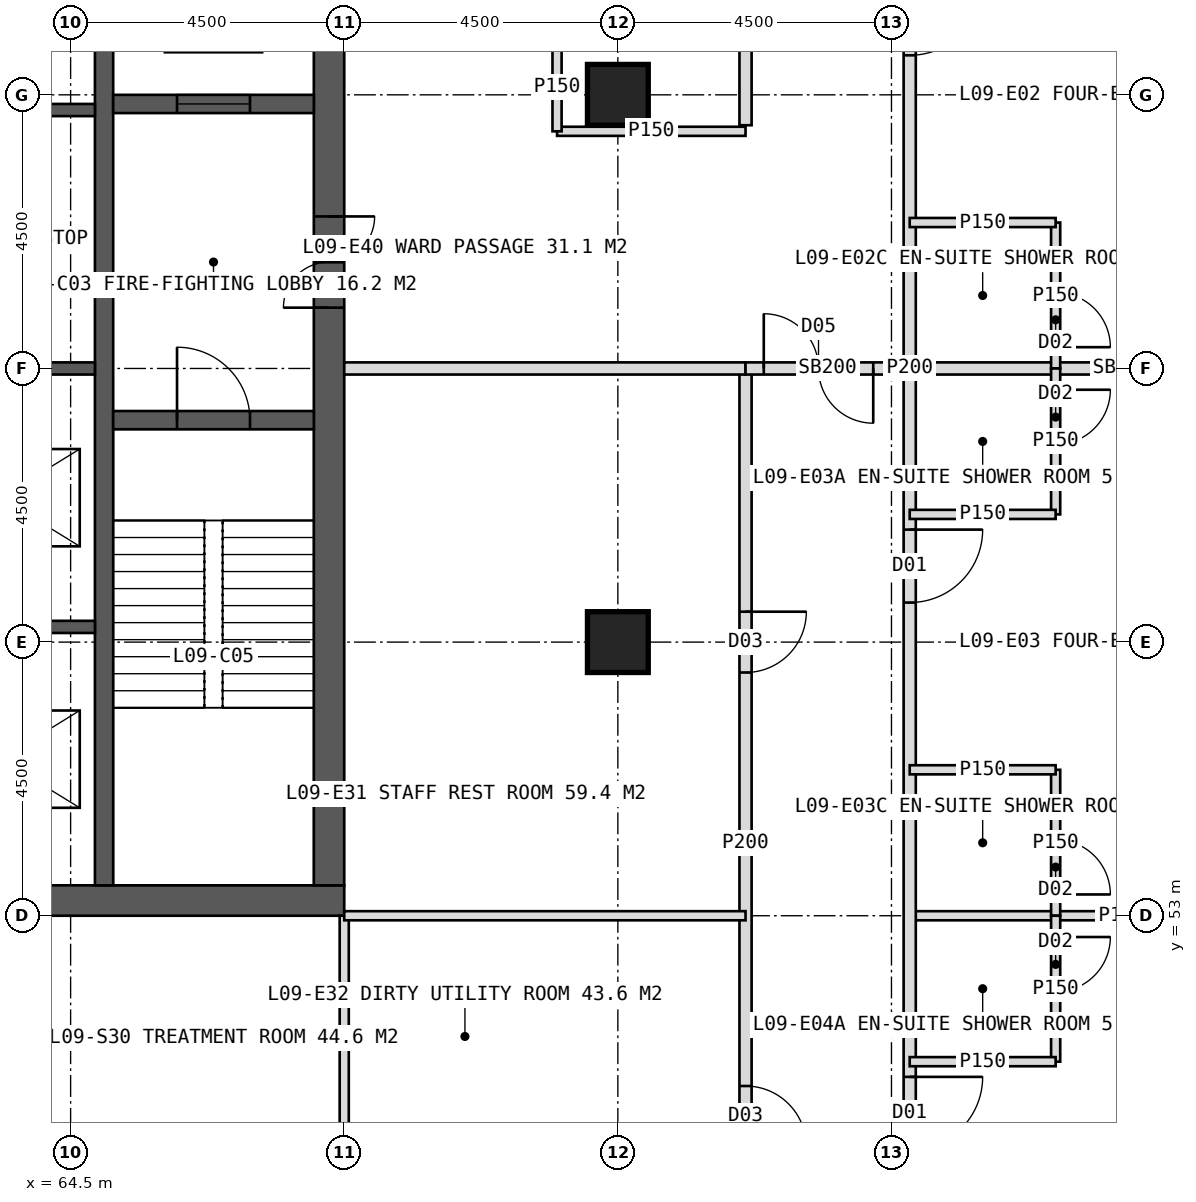
"""IFC4 building model, lengths in metres.
Left out: names, types, materials, properties, quantities, classifications, styles, units other than length and angle.
Written with IfcOpenShell. Run it as: python <this file> out.ifc"""

import sys

from ifc_helpers import new_model, si_unit, direction, frame, frame_2d, origin, origin_2d, place, context, subcontext, project, spatial, rectangle, hollow_rectangle, extrude, element, fill, save


model = new_model("IFC4")
c1 = context("Model", 3, precision=1e-05, world=origin(), true_north=direction((0.0, 1.0)))
c2 = subcontext(c1, "Body", "Model", "MODEL_VIEW")
j1 = project(units=[si_unit("LENGTHUNIT", "METRE"), si_unit("PLANEANGLEUNIT", "RADIAN")], contexts=[c1])
p1 = place(None, origin())
s1 = spatial("IfcSite", under=j1, at=p1, CompositionType="ELEMENT")
p2 = place(p1, origin())
s2 = spatial("IfcBuilding", under=s1, at=p2, CompositionType="ELEMENT")
p3 = place(p2, frame((0.0, 0.0, 43.0)))
s3 = spatial("IfcBuildingStorey", under=s2, at=p3, CompositionType="ELEMENT", Elevation=43.0)
p4 = place(p3, frame((51.0, 53.25, 0.0), z_axis=(0.0, 0.0, 1.0), x_axis=(1.0, 0.0, 0.0)))
e1 = element("IfcWall", 1, at=p4, inside=s3, PredefinedType="SHEAR", context=c2, shape_type="SweptSolid", body=[
    extrude(rectangle(XDim=18.0, YDim=0.5, at=frame_2d((9.0, 0.0))), origin(), (0.0, 0.0, 1.0), 4.0),
])
p5 = place(p4, frame((8.1, 0.0, 0.0)))
e2 = element("IfcOpeningElement", 2, at=p5, cuts=e1, PredefinedType="OPENING", context=c2, shape_type="SweptSolid", body=[
    extrude(rectangle(XDim=1.8, YDim=2.2, at=frame_2d((0.9, 1.1))), frame((0.0, 0.26, 0.0), z_axis=(0.0, -1.0, 0.0), x_axis=(1.0, 0.0, 0.0)), (0.0, 0.0, 1.0), 0.52),
])
p6 = place(p3, frame((68.75, 53.5, 0.0), z_axis=(0.0, 0.0, 1.0), x_axis=(0.0, 1.0, 0.0)))
e3 = element("IfcWall", 3, at=p6, inside=s3, PredefinedType="SHEAR", context=c2, shape_type="SweptSolid", body=[
    extrude(rectangle(XDim=17.0, YDim=0.5, at=frame_2d((8.5, 0.0))), origin(), (0.0, 0.0, 1.0), 4.0),
])
p7 = place(p6, frame((9.5, 0.0, 0.0)))
e4 = element("IfcOpeningElement", 4, at=p7, cuts=e3, PredefinedType="OPENING", context=c2, shape_type="SweptSolid", body=[
    extrude(rectangle(XDim=1.5, YDim=2.2, at=frame_2d((0.75, 1.1))), frame((0.0, 0.26, 0.0), z_axis=(0.0, -1.0, 0.0), x_axis=(1.0, 0.0, 0.0)), (0.0, 0.0, 1.0), 0.52),
])
p8 = place(p3, frame((65.05, 53.5, 0.0), z_axis=(0.0, 0.0, 1.0), x_axis=(0.0, 1.0, 0.0)))
e5 = element("IfcWall", 5, at=p8, inside=s3, PredefinedType="SHEAR", context=c2, shape_type="SweptSolid", body=[
    extrude(rectangle(XDim=17.0, YDim=0.3, at=frame_2d((8.5, 0.0))), origin(), (0.0, 0.0, 1.0), 4.0),
])
for number, where, z_axis, x_axis in (
    (6, (61.85, 57.75, 0.0), (0.0, 0.0, 1.0), (1.0, 0.0, 0.0)),
    (7, (61.85, 62.0, 0.0), (0.0, 0.0, 1.0), (1.0, 0.0, 0.0)),
    (8, (61.85, 66.25, 0.0), (0.0, 0.0, 1.0), (1.0, 0.0, 0.0)),
):
    element("IfcWall", number, at=place(p3, frame(where, z_axis=z_axis, x_axis=x_axis)), inside=s3, PredefinedType="SHEAR", context=c2, shape_type="SweptSolid", body=[
        extrude(rectangle(XDim=3.05, YDim=0.2, at=frame_2d((1.525, 0.0))), origin(), (0.0, 0.0, 1.0), 4.0),
    ])
p9 = place(p3, frame((65.2, 61.15, 0.0), z_axis=(0.0, 0.0, 1.0), x_axis=(1.0, 0.0, 0.0)))
e9 = element("IfcWall", 9, at=p9, inside=s3, PredefinedType="SHEAR", context=c2, shape_type="SweptSolid", body=[
    extrude(rectangle(XDim=3.3, YDim=0.3, at=frame_2d((1.65, 0.0))), origin(), (0.0, 0.0, 1.0), 4.0),
])
p10 = place(p9, frame((1.05, 0.0, 0.0)))
e10 = element("IfcOpeningElement", 10, at=p10, cuts=e9, PredefinedType="OPENING", context=c2, shape_type="SweptSolid", body=[
    extrude(rectangle(XDim=1.2, YDim=2.1, at=frame_2d((0.6, 1.05))), frame((0.0, 0.16, 0.0), z_axis=(0.0, -1.0, 0.0), x_axis=(1.0, 0.0, 0.0)), (0.0, 0.0, 1.0), 0.32),
])
p11 = place(p3, frame((65.2, 66.35, 0.0), z_axis=(0.0, 0.0, 1.0), x_axis=(1.0, 0.0, 0.0)))
e11 = element("IfcWall", 11, at=p11, inside=s3, PredefinedType="SHEAR", context=c2, shape_type="SweptSolid", body=[
    extrude(rectangle(XDim=3.3, YDim=0.3, at=frame_2d((1.65, 0.0))), origin(), (0.0, 0.0, 1.0), 4.0),
])
p12 = place(p11, frame((1.05, 0.0, 0.0)))
e12 = element("IfcOpeningElement", 12, at=p12, cuts=e11, PredefinedType="OPENING", context=c2, shape_type="SweptSolid", body=[
    extrude(rectangle(XDim=1.2, YDim=2.2, at=frame_2d((0.6, 1.1))), frame((0.0, 0.16, 0.0), z_axis=(0.0, -1.0, 0.0), x_axis=(1.0, 0.0, 0.0)), (0.0, 0.0, 1.0), 0.32),
])
for number, where, z_axis, x_axis in (
    (13, (73.5, 57.5, 0.0), (0.0, 0.0, 1.0), (1.0, 0.0, 0.0)),
    (14, (73.5, 66.5, 0.0), (0.0, 0.0, 1.0), (1.0, 0.0, 0.0)),
):
    element("IfcColumn", number, at=place(p3, frame(where, z_axis=z_axis, x_axis=x_axis)), inside=s3, PredefinedType="COLUMN", context=c2, shape_type="SweptSolid", body=[
        extrude(hollow_rectangle(XDim=1.0, YDim=1.0, WallThickness=0.1, at=origin_2d()), origin(), (0.0, 0.0, 1.0), 4.0),
    ])
p13 = place(p3, frame((69.0, 53.0, 0.0), z_axis=(0.0, 0.0, 1.0), x_axis=(0.0, -1.0, 0.0)))
e15 = element("IfcWall", 15, at=p13, inside=s3, PredefinedType="PARTITIONING", context=c2, shape_type="SweptSolid", body=[
    extrude(rectangle(XDim=6.6, YDim=0.15, at=frame_2d((3.3, 0.0))), origin(), (0.0, 0.0, 1.0), 3.75),
])
p14 = place(p3, frame((78.3, 62.0, 0.0), z_axis=(0.0, 0.0, 1.0), x_axis=(1.0, 0.0, 0.0)))
e16 = element("IfcWall", 16, at=p14, inside=s3, PredefinedType="SOLIDWALL", context=c2, shape_type="SweptSolid", body=[
    extrude(rectangle(XDim=6.975, YDim=0.2, at=frame_2d((3.487, 0.0))), origin(), (0.0, 0.0, 1.0), 2.75),
])
p15 = place(p3, frame((78.3, 53.0, 0.0), z_axis=(0.0, 0.0, 1.0), x_axis=(1.0, 0.0, 0.0)))
e17 = element("IfcWall", 17, at=p15, inside=s3, PredefinedType="PARTITIONING", context=c2, shape_type="SweptSolid", body=[
    extrude(rectangle(XDim=6.975, YDim=0.15, at=frame_2d((3.487, 0.0))), origin(), (0.0, 0.0, 1.0), 3.75),
])
p16 = place(p3, frame((78.3, 80.3, 0.0), z_axis=(0.0, 0.0, 1.0), x_axis=(0.0, -1.0, 0.0)))
e18 = element("IfcWall", 18, at=p16, inside=s3, PredefinedType="PARTITIONING", context=c2, shape_type="SweptSolid", body=[
    extrude(rectangle(XDim=36.6, YDim=0.2, at=frame_2d((18.3, 0.0))), origin(), (0.0, 0.0, 1.0), 3.75),
])
p17 = place(p16, frame((2.65, 0.0, 0.0)))
e19 = element("IfcOpeningElement", 19, at=p17, cuts=e18, PredefinedType="OPENING", context=c2, shape_type="SweptSolid", body=[
    extrude(rectangle(XDim=1.2, YDim=2.2, at=frame_2d((0.6, 1.1))), frame((0.0, 0.11, 0.0), z_axis=(0.0, -1.0, 0.0), x_axis=(1.0, 0.0, 0.0)), (0.0, 0.0, 1.0), 0.22),
])
p18 = place(p16, frame((11.95, 0.0, 0.0)))
e20 = element("IfcOpeningElement", 20, at=p18, cuts=e18, PredefinedType="OPENING", context=c2, shape_type="SweptSolid", body=[
    extrude(rectangle(XDim=1.2, YDim=2.2, at=frame_2d((0.6, 1.1))), frame((0.0, 0.11, 0.0), z_axis=(0.0, -1.0, 0.0), x_axis=(1.0, 0.0, 0.0)), (0.0, 0.0, 1.0), 0.22),
])
p19 = place(p16, frame((20.95, 0.0, 0.0)))
e21 = element("IfcOpeningElement", 21, at=p19, cuts=e18, PredefinedType="OPENING", context=c2, shape_type="SweptSolid", body=[
    extrude(rectangle(XDim=1.2, YDim=2.2, at=frame_2d((0.6, 1.1))), frame((0.0, 0.11, 0.0), z_axis=(0.0, -1.0, 0.0), x_axis=(1.0, 0.0, 0.0)), (0.0, 0.0, 1.0), 0.22),
])
p20 = place(p16, frame((29.95, 0.0, 0.0)))
e22 = element("IfcOpeningElement", 22, at=p20, cuts=e18, PredefinedType="OPENING", context=c2, shape_type="SweptSolid", body=[
    extrude(rectangle(XDim=1.2, YDim=2.2, at=frame_2d((0.6, 1.1))), frame((0.0, 0.11, 0.0), z_axis=(0.0, -1.0, 0.0), x_axis=(1.0, 0.0, 0.0)), (0.0, 0.0, 1.0), 0.22),
])
p21 = place(p3, frame((80.7, 64.4, 0.0), z_axis=(0.0, 0.0, 1.0), x_axis=(0.0, -1.0, 0.0)))
e23 = element("IfcWall", 23, at=p21, inside=s3, PredefinedType="PARTITIONING", context=c2, shape_type="SweptSolid", body=[
    extrude(rectangle(XDim=2.4, YDim=0.15, at=frame_2d((1.2, 0.0))), origin(), (0.0, 0.0, 1.0), 3.75),
])
p22 = place(p21, frame((1.15, 0.0, 0.0)))
e24 = element("IfcOpeningElement", 24, at=p22, cuts=e23, PredefinedType="OPENING", context=c2, shape_type="SweptSolid", body=[
    extrude(rectangle(XDim=0.9, YDim=2.1, at=frame_2d((0.45, 1.05))), frame((0.0, 0.085, 0.0), z_axis=(0.0, -1.0, 0.0), x_axis=(1.0, 0.0, 0.0)), (0.0, 0.0, 1.0), 0.17),
])
p23 = place(p3, frame((78.3, 64.4, 0.0), z_axis=(0.0, 0.0, 1.0), x_axis=(1.0, 0.0, 0.0)))
e25 = element("IfcWall", 25, at=p23, inside=s3, PredefinedType="PARTITIONING", context=c2, shape_type="SweptSolid", body=[
    extrude(rectangle(XDim=2.4, YDim=0.15, at=frame_2d((1.2, 0.0))), origin(), (0.0, 0.0, 1.0), 3.75),
])
p24 = place(p3, frame((80.7, 62.0, 0.0), z_axis=(0.0, 0.0, 1.0), x_axis=(0.0, -1.0, 0.0)))
e26 = element("IfcWall", 26, at=p24, inside=s3, PredefinedType="PARTITIONING", context=c2, shape_type="SweptSolid", body=[
    extrude(rectangle(XDim=2.4, YDim=0.15, at=frame_2d((1.2, 0.0))), origin(), (0.0, 0.0, 1.0), 3.75),
])
p25 = place(p24, frame((0.35, 0.0, 0.0)))
e27 = element("IfcOpeningElement", 27, at=p25, cuts=e26, PredefinedType="OPENING", context=c2, shape_type="SweptSolid", body=[
    extrude(rectangle(XDim=0.9, YDim=2.1, at=frame_2d((0.45, 1.05))), frame((0.0, 0.085, 0.0), z_axis=(0.0, -1.0, 0.0), x_axis=(1.0, 0.0, 0.0)), (0.0, 0.0, 1.0), 0.17),
])
p26 = place(p3, frame((78.3, 59.6, 0.0), z_axis=(0.0, 0.0, 1.0), x_axis=(1.0, 0.0, 0.0)))
e28 = element("IfcWall", 28, at=p26, inside=s3, PredefinedType="PARTITIONING", context=c2, shape_type="SweptSolid", body=[
    extrude(rectangle(XDim=2.4, YDim=0.15, at=frame_2d((1.2, 0.0))), origin(), (0.0, 0.0, 1.0), 3.75),
])
p27 = place(p3, frame((80.7, 55.4, 0.0), z_axis=(0.0, 0.0, 1.0), x_axis=(0.0, -1.0, 0.0)))
e29 = element("IfcWall", 29, at=p27, inside=s3, PredefinedType="PARTITIONING", context=c2, shape_type="SweptSolid", body=[
    extrude(rectangle(XDim=2.4, YDim=0.15, at=frame_2d((1.2, 0.0))), origin(), (0.0, 0.0, 1.0), 3.75),
])
p28 = place(p27, frame((1.15, 0.0, 0.0)))
e30 = element("IfcOpeningElement", 30, at=p28, cuts=e29, PredefinedType="OPENING", context=c2, shape_type="SweptSolid", body=[
    extrude(rectangle(XDim=0.9, YDim=2.1, at=frame_2d((0.45, 1.05))), frame((0.0, 0.085, 0.0), z_axis=(0.0, -1.0, 0.0), x_axis=(1.0, 0.0, 0.0)), (0.0, 0.0, 1.0), 0.17),
])
p29 = place(p3, frame((78.3, 55.4, 0.0), z_axis=(0.0, 0.0, 1.0), x_axis=(1.0, 0.0, 0.0)))
e31 = element("IfcWall", 31, at=p29, inside=s3, PredefinedType="PARTITIONING", context=c2, shape_type="SweptSolid", body=[
    extrude(rectangle(XDim=2.4, YDim=0.15, at=frame_2d((1.2, 0.0))), origin(), (0.0, 0.0, 1.0), 3.75),
])
p30 = place(p3, frame((80.7, 53.0, 0.0), z_axis=(0.0, 0.0, 1.0), x_axis=(0.0, -1.0, 0.0)))
e32 = element("IfcWall", 32, at=p30, inside=s3, PredefinedType="PARTITIONING", context=c2, shape_type="SweptSolid", body=[
    extrude(rectangle(XDim=2.4, YDim=0.15, at=frame_2d((1.2, 0.0))), origin(), (0.0, 0.0, 1.0), 3.75),
])
p31 = place(p30, frame((0.35, 0.0, 0.0)))
e33 = element("IfcOpeningElement", 33, at=p31, cuts=e32, PredefinedType="OPENING", context=c2, shape_type="SweptSolid", body=[
    extrude(rectangle(XDim=0.9, YDim=2.1, at=frame_2d((0.45, 1.05))), frame((0.0, 0.085, 0.0), z_axis=(0.0, -1.0, 0.0), x_axis=(1.0, 0.0, 0.0)), (0.0, 0.0, 1.0), 0.17),
])
p32 = place(p3, frame((78.3, 50.6, 0.0), z_axis=(0.0, 0.0, 1.0), x_axis=(1.0, 0.0, 0.0)))
e34 = element("IfcWall", 34, at=p32, inside=s3, PredefinedType="PARTITIONING", context=c2, shape_type="SweptSolid", body=[
    extrude(rectangle(XDim=2.4, YDim=0.15, at=frame_2d((1.2, 0.0))), origin(), (0.0, 0.0, 1.0), 3.75),
])
p33 = place(p3, frame((75.6, 77.6, 0.0), z_axis=(0.0, 0.0, 1.0), x_axis=(0.0, -1.0, 0.0)))
e35 = element("IfcWall", 35, at=p33, inside=s3, PredefinedType="PARTITIONING", context=c2, shape_type="SweptSolid", body=[
    extrude(rectangle(XDim=11.6, YDim=0.2, at=frame_2d((5.8, 0.0))), origin(), (0.0, 0.0, 1.0), 3.75),
])
p34 = place(p33, frame((8.6, 0.0, 0.0)))
e36 = element("IfcOpeningElement", 36, at=p34, cuts=e35, PredefinedType="OPENING", context=c2, shape_type="SweptSolid", body=[
    extrude(rectangle(XDim=1.0, YDim=2.1, at=frame_2d((0.5, 1.05))), frame((0.0, 0.11, 0.0), z_axis=(0.0, -1.0, 0.0), x_axis=(1.0, 0.0, 0.0)), (0.0, 0.0, 1.0), 0.22),
])
p35 = place(p3, frame((75.6, 62.0, 0.0), z_axis=(0.0, 0.0, 1.0), x_axis=(0.0, -1.0, 0.0)))
e37 = element("IfcWall", 37, at=p35, inside=s3, PredefinedType="PARTITIONING", context=c2, shape_type="SweptSolid", body=[
    extrude(rectangle(XDim=15.6, YDim=0.2, at=frame_2d((7.8, 0.0))), origin(), (0.0, 0.0, 1.0), 3.75),
])
p36 = place(p35, frame((4.0, 0.0, 0.0)))
e38 = element("IfcOpeningElement", 38, at=p36, cuts=e37, PredefinedType="OPENING", context=c2, shape_type="SweptSolid", body=[
    extrude(rectangle(XDim=1.0, YDim=2.1, at=frame_2d((0.5, 1.05))), frame((0.0, 0.11, 0.0), z_axis=(0.0, -1.0, 0.0), x_axis=(1.0, 0.0, 0.0)), (0.0, 0.0, 1.0), 0.22),
])
p37 = place(p35, frame((11.8, 0.0, 0.0)))
e39 = element("IfcOpeningElement", 39, at=p37, cuts=e37, PredefinedType="OPENING", context=c2, shape_type="SweptSolid", body=[
    extrude(rectangle(XDim=1.0, YDim=2.1, at=frame_2d((0.5, 1.05))), frame((0.0, 0.11, 0.0), z_axis=(0.0, -1.0, 0.0), x_axis=(1.0, 0.0, 0.0)), (0.0, 0.0, 1.0), 0.22),
])
p38 = place(p3, frame((72.5, 65.9, 0.0), z_axis=(0.0, 0.0, 1.0), x_axis=(1.0, 0.0, 0.0)))
e40 = element("IfcWall", 40, at=p38, inside=s3, PredefinedType="PARTITIONING", context=c2, shape_type="SweptSolid", body=[
    extrude(rectangle(XDim=3.1, YDim=0.15, at=frame_2d((1.55, 0.0))), origin(), (0.0, 0.0, 1.0), 3.75),
])
p39 = place(p3, frame((69.0, 62.0, 0.0), z_axis=(0.0, 0.0, 1.0), x_axis=(1.0, 0.0, 0.0)))
e41 = element("IfcWall", 41, at=p39, inside=s3, PredefinedType="SOLIDWALL", context=c2, shape_type="SweptSolid", body=[
    extrude(rectangle(XDim=6.6, YDim=0.2, at=frame_2d((3.3, 0.0))), origin(), (0.0, 0.0, 1.0), 2.75),
])
p40 = place(p3, frame((69.0, 53.0, 0.0), z_axis=(0.0, 0.0, 1.0), x_axis=(1.0, 0.0, 0.0)))
e42 = element("IfcWall", 42, at=p40, inside=s3, PredefinedType="PARTITIONING", context=c2, shape_type="SweptSolid", body=[
    extrude(rectangle(XDim=6.6, YDim=0.15, at=frame_2d((3.3, 0.0))), origin(), (0.0, 0.0, 1.0), 3.75),
])
p41 = place(p3, frame((75.6, 62.0, 0.0), z_axis=(0.0, 0.0, 1.0), x_axis=(1.0, 0.0, 0.0)))
e43 = element("IfcWall", 43, at=p41, inside=s3, PredefinedType="SOLIDWALL", context=c2, shape_type="SweptSolid", body=[
    extrude(rectangle(XDim=2.7, YDim=0.2, at=frame_2d((1.35, 0.0))), origin(), (0.0, 0.0, 1.0), 2.75),
])
p42 = place(p41, frame((0.3, 0.0, 0.0)))
e44 = element("IfcOpeningElement", 44, at=p42, cuts=e43, PredefinedType="OPENING", context=c2, shape_type="SweptSolid", body=[
    extrude(rectangle(XDim=1.8, YDim=2.2, at=frame_2d((0.9, 1.1))), frame((0.0, 0.11, 0.0), z_axis=(0.0, -1.0, 0.0), x_axis=(1.0, 0.0, 0.0)), (0.0, 0.0, 1.0), 0.22),
])
p43 = place(p3, frame((72.5, 65.9, 0.0), z_axis=(0.0, 0.0, 1.0), x_axis=(0.0, 1.0, 0.0)))
e45 = element("IfcWall", 45, at=p43, inside=s3, PredefinedType="PARTITIONING", context=c2, shape_type="SweptSolid", body=[
    extrude(rectangle(XDim=1.45, YDim=0.15, at=frame_2d((0.725, 0.0))), origin(), (0.0, 0.0, 1.0), 3.75),
])
p44 = place(p18, origin())
e46 = element("IfcDoor", 46, at=p44, inside=s3, OperationType="SINGLE_SWING_LEFT", PredefinedType="DOOR", context=c2, shape_type="SweptSolid", body=[
    extrude(rectangle(XDim=1.2, YDim=2.2, at=frame_2d((0.6, 1.1))), frame((0.0, 0.025, 0.0), z_axis=(0.0, -1.0, 0.0), x_axis=(1.0, 0.0, 0.0)), (0.0, 0.0, 1.0), 0.05),
])
fill(e20, e46)
p45 = place(p22, origin())
e47 = element("IfcDoor", 47, at=p45, inside=s3, OperationType="SINGLE_SWING_RIGHT", PredefinedType="DOOR", context=c2, shape_type="SweptSolid", body=[
    extrude(rectangle(XDim=0.9, YDim=2.1, at=frame_2d((0.45, 1.05))), frame((0.0, 0.025, 0.0), z_axis=(0.0, -1.0, 0.0), x_axis=(1.0, 0.0, 0.0)), (0.0, 0.0, 1.0), 0.05),
])
fill(e24, e47)
p46 = place(p19, origin())
e48 = element("IfcDoor", 48, at=p46, inside=s3, OperationType="SINGLE_SWING_LEFT", PredefinedType="DOOR", context=c2, shape_type="SweptSolid", body=[
    extrude(rectangle(XDim=1.2, YDim=2.2, at=frame_2d((0.6, 1.1))), frame((0.0, 0.025, 0.0), z_axis=(0.0, -1.0, 0.0), x_axis=(1.0, 0.0, 0.0)), (0.0, 0.0, 1.0), 0.05),
])
fill(e21, e48)
p47 = place(p25, origin())
e49 = element("IfcDoor", 49, at=p47, inside=s3, OperationType="SINGLE_SWING_LEFT", PredefinedType="DOOR", context=c2, shape_type="SweptSolid", body=[
    extrude(rectangle(XDim=0.9, YDim=2.1, at=frame_2d((0.45, 1.05))), frame((0.0, 0.025, 0.0), z_axis=(0.0, -1.0, 0.0), x_axis=(1.0, 0.0, 0.0)), (0.0, 0.0, 1.0), 0.05),
])
fill(e27, e49)
p48 = place(p28, origin())
e50 = element("IfcDoor", 50, at=p48, inside=s3, OperationType="SINGLE_SWING_RIGHT", PredefinedType="DOOR", context=c2, shape_type="SweptSolid", body=[
    extrude(rectangle(XDim=0.9, YDim=2.1, at=frame_2d((0.45, 1.05))), frame((0.0, 0.025, 0.0), z_axis=(0.0, -1.0, 0.0), x_axis=(1.0, 0.0, 0.0)), (0.0, 0.0, 1.0), 0.05),
])
fill(e30, e50)
p49 = place(p20, origin())
e51 = element("IfcDoor", 51, at=p49, inside=s3, OperationType="SINGLE_SWING_LEFT", PredefinedType="DOOR", context=c2, shape_type="SweptSolid", body=[
    extrude(rectangle(XDim=1.2, YDim=2.2, at=frame_2d((0.6, 1.1))), frame((0.0, 0.025, 0.0), z_axis=(0.0, -1.0, 0.0), x_axis=(1.0, 0.0, 0.0)), (0.0, 0.0, 1.0), 0.05),
])
fill(e22, e51)
p50 = place(p31, origin())
e52 = element("IfcDoor", 52, at=p50, inside=s3, OperationType="SINGLE_SWING_LEFT", PredefinedType="DOOR", context=c2, shape_type="SweptSolid", body=[
    extrude(rectangle(XDim=0.9, YDim=2.1, at=frame_2d((0.45, 1.05))), frame((0.0, 0.025, 0.0), z_axis=(0.0, -1.0, 0.0), x_axis=(1.0, 0.0, 0.0)), (0.0, 0.0, 1.0), 0.05),
])
fill(e33, e52)
p51 = place(p36, origin())
e53 = element("IfcDoor", 53, at=p51, inside=s3, OperationType="SINGLE_SWING_LEFT", PredefinedType="DOOR", context=c2, shape_type="SweptSolid", body=[
    extrude(rectangle(XDim=1.0, YDim=2.1, at=frame_2d((0.5, 1.05))), frame((0.0, 0.025, 0.0), z_axis=(0.0, -1.0, 0.0), x_axis=(1.0, 0.0, 0.0)), (0.0, 0.0, 1.0), 0.05),
])
fill(e38, e53)
p52 = place(p37, origin())
e54 = element("IfcDoor", 54, at=p52, inside=s3, OperationType="SINGLE_SWING_RIGHT", PredefinedType="DOOR", context=c2, shape_type="SweptSolid", body=[
    extrude(rectangle(XDim=1.0, YDim=2.1, at=frame_2d((0.5, 1.05))), frame((0.0, 0.025, 0.0), z_axis=(0.0, -1.0, 0.0), x_axis=(1.0, 0.0, 0.0)), (0.0, 0.0, 1.0), 0.05),
])
fill(e39, e54)
p53 = place(p42, origin())
e55 = element("IfcDoor", 55, at=p53, inside=s3, OperationType="DOUBLE_DOOR_DOUBLE_SWING", PredefinedType="DOOR", context=c2, shape_type="SweptSolid", body=[
    extrude(rectangle(XDim=1.8, YDim=2.2, at=frame_2d((0.9, 1.1))), frame((0.0, 0.025, 0.0), z_axis=(0.0, -1.0, 0.0), x_axis=(1.0, 0.0, 0.0)), (0.0, 0.0, 1.0), 0.05),
])
fill(e44, e55)
p54 = place(p7, origin())
e56 = element("IfcDoor", 56, at=p54, inside=s3, OperationType="DOUBLE_DOOR_SINGLE_SWING", PredefinedType="DOOR", context=c2, shape_type="SweptSolid", body=[
    extrude(rectangle(XDim=1.5, YDim=2.2, at=frame_2d((0.75, 1.1))), frame((0.0, 0.025, 0.0), z_axis=(0.0, -1.0, 0.0), x_axis=(1.0, 0.0, 0.0)), (0.0, 0.0, 1.0), 0.05),
])
fill(e4, e56)
p55 = place(p10, origin())
e57 = element("IfcDoor", 57, at=p55, inside=s3, OperationType="SINGLE_SWING_LEFT", PredefinedType="DOOR", context=c2, shape_type="SweptSolid", body=[
    extrude(rectangle(XDim=1.2, YDim=2.1, at=frame_2d((0.6, 1.05))), frame((0.0, 0.025, 0.0), z_axis=(0.0, -1.0, 0.0), x_axis=(1.0, 0.0, 0.0)), (0.0, 0.0, 1.0), 0.05),
])
fill(e10, e57)
p56 = place(p12, origin())
e58 = element("IfcDoor", 58, at=p56, inside=s3, OperationType="SLIDING_TO_LEFT", PredefinedType="DOOR", context=c2, shape_type="SweptSolid", body=[
    extrude(rectangle(XDim=1.2, YDim=2.2, at=frame_2d((0.6, 1.1))), frame((0.0, 0.025, 0.0), z_axis=(0.0, -1.0, 0.0), x_axis=(1.0, 0.0, 0.0)), (0.0, 0.0, 1.0), 0.05),
])
fill(e12, e58)
save(model, sys.argv[1])
